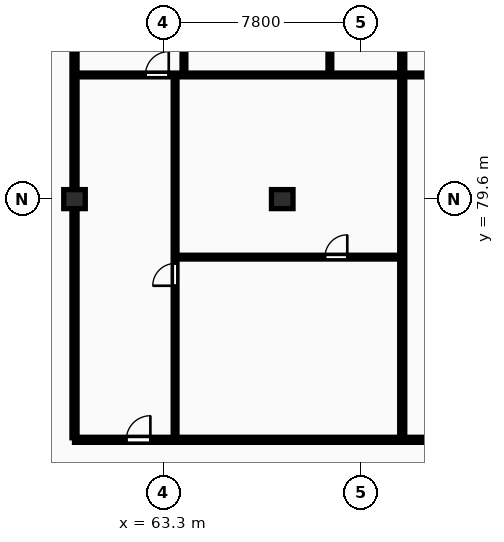
"""IFC4 building model, lengths in metres.
Left out: names, types, materials, properties, quantities, classifications, styles, units other than length and angle.
Written with IfcOpenShell. Run it as: python <this file> out.ifc"""

import sys

from ifc_helpers import new_model, si_unit, direction, frame, frame_2d, origin, origin_2d, place, context, subcontext, project, spatial, rectangle, extrude, element, fill, save


model = new_model("IFC4")
c1 = context("Model", 3, precision=1e-05, world=origin(), true_north=direction((0.0, 1.0)))
c2 = subcontext(c1, "Body", "Model", "MODEL_VIEW")
j1 = project(units=[si_unit("LENGTHUNIT", "METRE"), si_unit("PLANEANGLEUNIT", "RADIAN")], contexts=[c1])
p1 = place(None, origin())
s1 = spatial("IfcSite", under=j1, at=p1, CompositionType="ELEMENT")
p2 = place(p1, origin())
s2 = spatial("IfcBuilding", under=s1, at=p2, CompositionType="ELEMENT")
p3 = place(p2, frame((0.0, 0.0, 210.85)))
s3 = spatial("IfcBuildingStorey", under=s2, at=p3, CompositionType="ELEMENT", Elevation=210.85)
for number, where, z_axis, x_axis in (
    (1, (59.8, 79.6, 0.0), (0.0, 0.0, 1.0), (1.0, 0.0, 0.0)),
    (2, (68.0, 79.6, 0.0), (0.0, 0.0, 1.0), (1.0, 0.0, 0.0)),
):
    element("IfcColumn", number, at=place(p3, frame(where, z_axis=z_axis, x_axis=x_axis)), inside=s3, PredefinedType="COLUMN", context=c2, shape_type="SweptSolid", body=[
        extrude(rectangle(XDim=0.85, YDim=0.75, at=origin_2d()), origin(), (0.0, 0.0, 1.0), 3.25),
    ])
p4 = place(p3, frame((59.8, 70.18, 0.0), z_axis=(0.0, 0.0, 1.0), x_axis=(0.0, 1.0, 0.0)))
e3 = element("IfcWall", 3, at=p4, inside=s3, PredefinedType="PARTITIONING", context=c2, shape_type="SweptSolid", body=[
    extrude(rectangle(XDim=24.32, YDim=0.2, at=frame_2d((12.16, 0.0))), origin(), (0.0, 0.0, 1.0), 2.277),
])
p5 = place(p3, frame((72.736, 70.18, 0.0), z_axis=(0.0, 0.0, 1.0), x_axis=(0.0, 1.0, 0.0)))
e4 = element("IfcWall", 4, at=p5, inside=s3, PredefinedType="PARTITIONING", context=c2, shape_type="SweptSolid", body=[
    extrude(rectangle(XDim=24.32, YDim=0.2, at=frame_2d((12.16, 0.0))), origin(), (0.0, 0.0, 1.0), 2.97),
])
p6 = place(p3, frame((63.83, 77.31, 0.0), z_axis=(0.0, 0.0, 1.0), x_axis=(1.0, 0.0, 0.0)))
e5 = element("IfcWall", 5, at=p6, inside=s3, PredefinedType="PARTITIONING", context=c2, shape_type="SweptSolid", body=[
    extrude(rectangle(XDim=8.826, YDim=0.15, at=frame_2d((4.413, 0.0))), origin(), (0.0, 0.0, 1.0), 2.97),
])
p7 = place(p6, frame((5.857, 0.0, 0.0)))
e6 = element("IfcOpeningElement", 6, at=p7, cuts=e5, PredefinedType="OPENING", context=c2, shape_type="SweptSolid", body=[
    extrude(rectangle(XDim=0.88, YDim=2.06, at=frame_2d((0.44, 1.03))), frame((0.0, 0.085, 0.0), z_axis=(0.0, -1.0, 0.0), x_axis=(1.0, 0.0, 0.0)), (0.0, 0.0, 1.0), 0.17),
])
p8 = place(p3, frame((63.77, 70.16, 0.0), z_axis=(0.0, 0.0, 1.0), x_axis=(0.0, 1.0, 0.0)))
e7 = element("IfcWall", 7, at=p8, inside=s3, PredefinedType="PARTITIONING", context=c2, shape_type="SweptSolid", body=[
    extrude(rectangle(XDim=14.3, YDim=0.15, at=frame_2d((7.15, 0.0))), origin(), (0.0, 0.0, 1.0), 2.97),
])
p9 = place(p8, frame((6.02, 0.0, 0.0)))
e8 = element("IfcOpeningElement", 8, at=p9, cuts=e7, PredefinedType="OPENING", context=c2, shape_type="SweptSolid", body=[
    extrude(rectangle(XDim=0.88, YDim=2.06, at=frame_2d((0.44, 1.03))), frame((0.0, 0.085, 0.0), z_axis=(0.0, -1.0, 0.0), x_axis=(1.0, 0.0, 0.0)), (0.0, 0.0, 1.0), 0.17),
])
p10 = place(p3, frame((64.12, 84.54, 0.0), z_axis=(0.0, 0.0, 1.0), x_axis=(0.0, 1.0, 0.0)))
e9 = element("IfcWall", 9, at=p10, inside=s3, PredefinedType="PARTITIONING", context=c2, shape_type="SweptSolid", body=[
    extrude(rectangle(XDim=5.0, YDim=0.15, at=frame_2d((2.5, 0.0))), origin(), (0.0, 0.0, 1.0), 2.97),
])
p11 = place(p10, frame((2.06, 0.0, 0.0)))
e10 = element("IfcOpeningElement", 10, at=p11, cuts=e9, PredefinedType="OPENING", context=c2, shape_type="SweptSolid", body=[
    extrude(rectangle(XDim=0.88, YDim=2.06, at=frame_2d((0.44, 1.03))), frame((0.0, 0.085, 0.0), z_axis=(0.0, -1.0, 0.0), x_axis=(1.0, 0.0, 0.0)), (0.0, 0.0, 1.0), 0.17),
])
p12 = place(p3, frame((69.88, 84.54, 0.0), z_axis=(0.0, 0.0, 1.0), x_axis=(0.0, 1.0, 0.0)))
e11 = element("IfcWall", 11, at=p12, inside=s3, PredefinedType="PARTITIONING", context=c2, shape_type="SweptSolid", body=[
    extrude(rectangle(XDim=9.96, YDim=0.15, at=frame_2d((4.98, 0.0))), origin(), (0.0, 0.0, 1.0), 2.97),
])
p13 = place(p12, frame((1.43, 0.0, 0.0)))
e12 = element("IfcOpeningElement", 12, at=p13, cuts=e11, PredefinedType="OPENING", context=c2, shape_type="SweptSolid", body=[
    extrude(rectangle(XDim=0.84, YDim=2.04, at=frame_2d((0.42, 1.02))), frame((0.0, 0.085, 0.0), z_axis=(0.0, -1.0, 0.0), x_axis=(1.0, 0.0, 0.0)), (0.0, 0.0, 1.0), 0.17),
])
p14 = place(p12, frame((3.92, 0.0, 0.0)))
e13 = element("IfcOpeningElement", 13, at=p14, cuts=e11, PredefinedType="OPENING", context=c2, shape_type="SweptSolid", body=[
    extrude(rectangle(XDim=0.84, YDim=2.04, at=frame_2d((0.42, 1.02))), frame((0.0, 0.085, 0.0), z_axis=(0.0, -1.0, 0.0), x_axis=(1.0, 0.0, 0.0)), (0.0, 0.0, 1.0), 0.17),
])
p15 = place(p12, frame((8.297, 0.0, 0.0)))
e14 = element("IfcOpeningElement", 14, at=p15, cuts=e11, PredefinedType="OPENING", context=c2, shape_type="SweptSolid", body=[
    extrude(rectangle(XDim=0.88, YDim=2.06, at=frame_2d((0.44, 1.03))), frame((0.0, 0.085, 0.0), z_axis=(0.0, -1.0, 0.0), x_axis=(1.0, 0.0, 0.0)), (0.0, 0.0, 1.0), 0.17),
])
p16 = place(p3, frame((59.88, 84.5, 0.0), z_axis=(0.0, 0.0, 1.0), x_axis=(1.0, 0.0, 0.0)))
e15 = element("IfcWall", 15, at=p16, inside=s3, PredefinedType="PARTITIONING", context=c2, shape_type="SweptSolid", body=[
    extrude(rectangle(XDim=12.776, YDim=0.15, at=frame_2d((6.388, 0.0))), origin(), (0.0, 0.0, 1.0), 2.97),
])
p17 = place(p16, frame((2.72, 0.0, 0.0)))
e16 = element("IfcOpeningElement", 16, at=p17, cuts=e15, PredefinedType="OPENING", context=c2, shape_type="SweptSolid", body=[
    extrude(rectangle(XDim=0.92, YDim=2.08, at=frame_2d((0.46, 1.04))), frame((0.0, 0.085, 0.0), z_axis=(0.0, -1.0, 0.0), x_axis=(1.0, 0.0, 0.0)), (0.0, 0.0, 1.0), 0.17),
])
p18 = place(p3, frame((72.816, 84.5, 0.0), z_axis=(0.0, 0.0, 1.0), x_axis=(1.0, 0.0, 0.0)))
e17 = element("IfcWall", 17, at=p18, inside=s3, PredefinedType="PARTITIONING", context=c2, shape_type="SweptSolid", body=[
    extrude(rectangle(XDim=12.904, YDim=0.15, at=frame_2d((6.452, 0.0))), origin(), (0.0, 0.0, 1.0), 2.97),
])
p19 = place(p18, frame((2.72, 0.0, 0.0)))
e18 = element("IfcOpeningElement", 18, at=p19, cuts=e17, PredefinedType="OPENING", context=c2, shape_type="SweptSolid", body=[
    extrude(rectangle(XDim=0.92, YDim=2.08, at=frame_2d((0.46, 1.04))), frame((0.0, 0.085, 0.0), z_axis=(0.0, -1.0, 0.0), x_axis=(1.0, 0.0, 0.0)), (0.0, 0.0, 1.0), 0.17),
])
p20 = place(p3, frame((59.8, 70.1, 0.0), z_axis=(0.0, 0.0, 1.0), x_axis=(1.0, 0.0, 0.0)))
e19 = element("IfcWall", 19, at=p20, inside=s3, PredefinedType="PARTITIONING", context=c2, shape_type="SweptSolid", body=[
    extrude(rectangle(XDim=68.6, YDim=0.2, at=frame_2d((34.3, 0.0))), origin(), (0.0, 0.0, 1.0), 2.97),
])
p21 = place(p20, frame((2.045, 0.0, 0.0)))
e20 = element("IfcOpeningElement", 20, at=p21, cuts=e19, PredefinedType="OPENING", context=c2, shape_type="SweptSolid", body=[
    extrude(rectangle(XDim=0.95, YDim=2.15, at=frame_2d((0.475, 1.075))), frame((0.0, 0.11, 0.0), z_axis=(0.0, -1.0, 0.0), x_axis=(1.0, 0.0, 0.0)), (0.0, 0.0, 1.0), 0.22),
])
p22 = place(p20, frame((14.981, 0.0, 0.0)))
e21 = element("IfcOpeningElement", 21, at=p22, cuts=e19, PredefinedType="OPENING", context=c2, shape_type="SweptSolid", body=[
    extrude(rectangle(XDim=0.95, YDim=2.15, at=frame_2d((0.475, 1.075))), frame((0.0, 0.11, 0.0), z_axis=(0.0, -1.0, 0.0), x_axis=(1.0, 0.0, 0.0)), (0.0, 0.0, 1.0), 0.22),
])
p23 = place(p20, frame((28.045, 0.0, 0.0)))
e22 = element("IfcOpeningElement", 22, at=p23, cuts=e19, PredefinedType="OPENING", context=c2, shape_type="SweptSolid", body=[
    extrude(rectangle(XDim=0.95, YDim=2.15, at=frame_2d((0.475, 1.075))), frame((0.0, 0.11, 0.0), z_axis=(0.0, -1.0, 0.0), x_axis=(1.0, 0.0, 0.0)), (0.0, 0.0, 1.0), 0.22),
])
p24 = place(p20, frame((40.981, 0.0, 0.0)))
e23 = element("IfcOpeningElement", 23, at=p24, cuts=e19, PredefinedType="OPENING", context=c2, shape_type="SweptSolid", body=[
    extrude(rectangle(XDim=0.95, YDim=2.15, at=frame_2d((0.475, 1.075))), frame((0.0, 0.11, 0.0), z_axis=(0.0, -1.0, 0.0), x_axis=(1.0, 0.0, 0.0)), (0.0, 0.0, 1.0), 0.22),
])
p25 = place(p20, frame((54.045, 0.0, 0.0)))
e24 = element("IfcOpeningElement", 24, at=p25, cuts=e19, PredefinedType="OPENING", context=c2, shape_type="SweptSolid", body=[
    extrude(rectangle(XDim=0.95, YDim=2.15, at=frame_2d((0.475, 1.075))), frame((0.0, 0.11, 0.0), z_axis=(0.0, -1.0, 0.0), x_axis=(1.0, 0.0, 0.0)), (0.0, 0.0, 1.0), 0.22),
])
p26 = place(p7, origin())
e25 = element("IfcDoor", 25, at=p26, inside=s3, OperationType="SINGLE_SWING_RIGHT", PredefinedType="DOOR", context=c2, shape_type="SweptSolid", body=[
    extrude(rectangle(XDim=0.88, YDim=2.06, at=frame_2d((0.44, 1.03))), frame((0.0, 0.025, 0.0), z_axis=(0.0, -1.0, 0.0), x_axis=(1.0, 0.0, 0.0)), (0.0, 0.0, 1.0), 0.05),
])
fill(e6, e25)
p27 = place(p9, origin())
e26 = element("IfcDoor", 26, at=p27, inside=s3, OperationType="SINGLE_SWING_LEFT", PredefinedType="DOOR", context=c2, shape_type="SweptSolid", body=[
    extrude(rectangle(XDim=0.88, YDim=2.06, at=frame_2d((0.44, 1.03))), frame((0.0, 0.025, 0.0), z_axis=(0.0, -1.0, 0.0), x_axis=(1.0, 0.0, 0.0)), (0.0, 0.0, 1.0), 0.05),
])
fill(e8, e26)
p28 = place(p17, origin())
e27 = element("IfcDoor", 27, at=p28, inside=s3, OperationType="SINGLE_SWING_RIGHT", PredefinedType="DOOR", context=c2, shape_type="SweptSolid", body=[
    extrude(rectangle(XDim=0.92, YDim=2.08, at=frame_2d((0.46, 1.04))), frame((0.0, 0.025, 0.0), z_axis=(0.0, -1.0, 0.0), x_axis=(1.0, 0.0, 0.0)), (0.0, 0.0, 1.0), 0.05),
])
fill(e16, e27)
p29 = place(p21, origin())
e28 = element("IfcDoor", 28, at=p29, inside=s3, OperationType="SINGLE_SWING_RIGHT", PredefinedType="DOOR", context=c2, shape_type="SweptSolid", body=[
    extrude(rectangle(XDim=0.95, YDim=2.15, at=frame_2d((0.475, 1.075))), frame((0.0, 0.025, 0.0), z_axis=(0.0, -1.0, 0.0), x_axis=(1.0, 0.0, 0.0)), (0.0, 0.0, 1.0), 0.05),
])
fill(e20, e28)
save(model, sys.argv[1])
